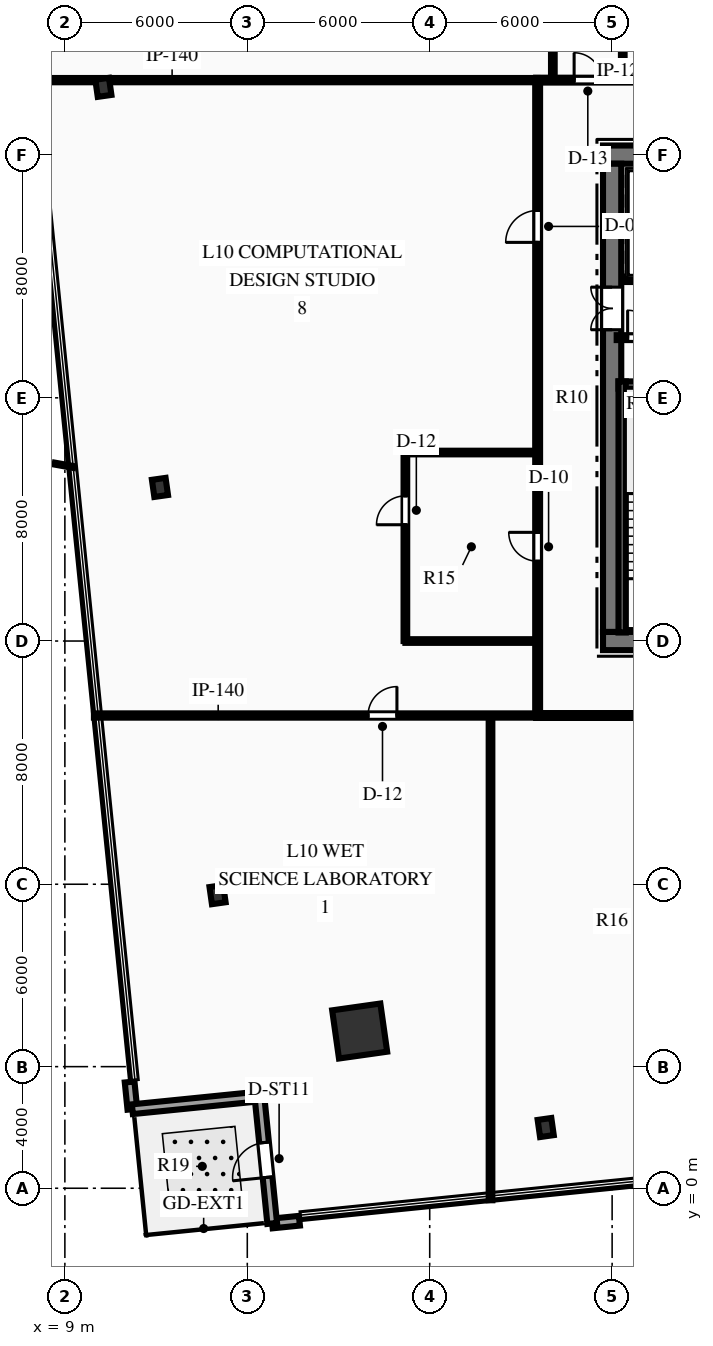
"""IFC4 building model, lengths in metres.
Left out: names, types, materials, properties, quantities, classifications, styles, units other than length and angle.
Written with IfcOpenShell. Run it as: python <this file> out.ifc"""

import sys

from ifc_helpers import new_model, si_unit, direction, frame, frame_2d, origin, origin_2d, place, context, subcontext, project, spatial, rectangle, hollow_rectangle, i_section, extrude, element, fill, save


model = new_model("IFC4")
c1 = context("Model", 3, precision=1e-05, world=origin(), true_north=direction((0.0, 1.0)))
c2 = subcontext(c1, "Body", "Model", "MODEL_VIEW")
j1 = project(units=[si_unit("LENGTHUNIT", "METRE"), si_unit("PLANEANGLEUNIT", "RADIAN")], contexts=[c1])
p1 = place(None, origin())
s1 = spatial("IfcSite", under=j1, at=p1, CompositionType="ELEMENT")
p2 = place(p1, origin())
s2 = spatial("IfcBuilding", under=s1, at=p2, CompositionType="ELEMENT")
p3 = place(p2, frame((0.0, 0.0, 47.7)))
s3 = spatial("IfcBuildingStorey", under=s2, at=p3, CompositionType="ELEMENT", Elevation=47.7)
p4 = place(p3, frame((26.7, 18.0, 0.0), z_axis=(0.0, 0.0, 1.0), x_axis=(1.0, 0.0, 0.0)))
e1 = element("IfcWall", 1, at=p4, inside=s3, PredefinedType="SHEAR", context=c2, shape_type="SweptSolid", body=[
    extrude(rectangle(XDim=18.6, YDim=0.6, at=frame_2d((9.3, 0.0))), origin(), (0.0, 0.0, 1.0), 3.75),
])
p5 = place(p4, frame((7.4, 0.0, 0.0)))
e2 = element("IfcOpeningElement", 2, at=p5, cuts=e1, PredefinedType="OPENING", context=c2, shape_type="SweptSolid", body=[
    extrude(rectangle(XDim=1.1, YDim=2.15, at=frame_2d((0.55, 1.075))), frame((0.0, 0.31, 0.0), z_axis=(0.0, -1.0, 0.0), x_axis=(1.0, 0.0, 0.0)), (0.0, 0.0, 1.0), 0.62),
])
p6 = place(p4, frame((10.1, 0.0, 0.0)))
e3 = element("IfcOpeningElement", 3, at=p6, cuts=e1, PredefinedType="OPENING", context=c2, shape_type="SweptSolid", body=[
    extrude(rectangle(XDim=1.1, YDim=2.15, at=frame_2d((0.55, 1.075))), frame((0.0, 0.31, 0.0), z_axis=(0.0, -1.0, 0.0), x_axis=(1.0, 0.0, 0.0)), (0.0, 0.0, 1.0), 0.62),
])
p7 = place(p3, frame((26.7, 34.0, 0.0), z_axis=(0.0, 0.0, 1.0), x_axis=(1.0, 0.0, 0.0)))
e4 = element("IfcWall", 4, at=p7, inside=s3, PredefinedType="SHEAR", context=c2, shape_type="SweptSolid", body=[
    extrude(rectangle(XDim=18.6, YDim=0.6, at=frame_2d((9.3, 0.0))), origin(), (0.0, 0.0, 1.0), 3.75),
])
p8 = place(p7, frame((1.265, 0.0, 0.0)))
e5 = element("IfcOpeningElement", 5, at=p8, cuts=e4, PredefinedType="OPENING", context=c2, shape_type="SweptSolid", body=[
    extrude(rectangle(XDim=1.1, YDim=2.15, at=frame_2d((0.55, 1.075))), frame((0.0, 0.31, 0.0), z_axis=(0.0, -1.0, 0.0), x_axis=(1.0, 0.0, 0.0)), (0.0, 0.0, 1.0), 0.62),
])
p9 = place(p7, frame((3.515, 0.0, 0.0)))
e6 = element("IfcOpeningElement", 6, at=p9, cuts=e4, PredefinedType="OPENING", context=c2, shape_type="SweptSolid", body=[
    extrude(rectangle(XDim=1.1, YDim=2.15, at=frame_2d((0.55, 1.075))), frame((0.0, 0.31, 0.0), z_axis=(0.0, -1.0, 0.0), x_axis=(1.0, 0.0, 0.0)), (0.0, 0.0, 1.0), 0.62),
])
p10 = place(p7, frame((13.985, 0.0, 0.0)))
e7 = element("IfcOpeningElement", 7, at=p10, cuts=e4, PredefinedType="OPENING", context=c2, shape_type="SweptSolid", body=[
    extrude(rectangle(XDim=1.1, YDim=2.15, at=frame_2d((0.55, 1.075))), frame((0.0, 0.31, 0.0), z_axis=(0.0, -1.0, 0.0), x_axis=(1.0, 0.0, 0.0)), (0.0, 0.0, 1.0), 0.62),
])
p11 = place(p7, frame((16.235, 0.0, 0.0)))
e8 = element("IfcOpeningElement", 8, at=p11, cuts=e4, PredefinedType="OPENING", context=c2, shape_type="SweptSolid", body=[
    extrude(rectangle(XDim=1.1, YDim=2.15, at=frame_2d((0.55, 1.075))), frame((0.0, 0.31, 0.0), z_axis=(0.0, -1.0, 0.0), x_axis=(1.0, 0.0, 0.0)), (0.0, 0.0, 1.0), 0.62),
])
p12 = place(p3, frame((27.0, 18.3, 0.0), z_axis=(0.0, 0.0, 1.0), x_axis=(0.0, 1.0, 0.0)))
e9 = element("IfcWall", 9, at=p12, inside=s3, PredefinedType="SHEAR", context=c2, shape_type="SweptSolid", body=[
    extrude(rectangle(XDim=15.4, YDim=0.6, at=frame_2d((7.7, 0.0))), origin(), (0.0, 0.0, 1.0), 3.75),
])
p13 = place(p12, frame((9.94, 0.0, 0.0)))
e10 = element("IfcOpeningElement", 10, at=p13, cuts=e9, PredefinedType="OPENING", context=c2, shape_type="SweptSolid", body=[
    extrude(rectangle(XDim=1.4, YDim=2.2, at=frame_2d((0.7, 1.1))), frame((0.0, 0.31, 0.0), z_axis=(0.0, -1.0, 0.0), x_axis=(1.0, 0.0, 0.0)), (0.0, 0.0, 1.0), 0.62),
])
p14 = place(p3, frame((27.21, 26.42, 0.0), z_axis=(0.0, 0.0, 1.0), x_axis=(1.0, 0.0, 0.0)))
e11 = element("IfcWall", 11, at=p14, inside=s3, PredefinedType="SHEAR", context=c2, shape_type="SweptSolid", body=[
    extrude(rectangle(XDim=3.98, YDim=0.24, at=frame_2d((1.99, 0.0))), origin(), (0.0, 0.0, 1.0), 3.75),
])
p15 = place(p3, frame((27.33, 18.28, 0.0), z_axis=(0.0, 0.0, 1.0), x_axis=(0.0, 1.0, 0.0)))
e12 = element("IfcWall", 12, at=p15, inside=s3, PredefinedType="SHEAR", context=c2, shape_type="SweptSolid", body=[
    extrude(rectangle(XDim=8.26, YDim=0.24, at=frame_2d((4.13, 0.0))), origin(), (0.0, 0.0, 1.0), 3.75),
])
p16 = place(p3, frame((18.696, 5.172, 0.0), z_axis=(0.0, 0.0, 1.0), x_axis=(0.990146240249, 0.140037219771, 0.0)))
e13 = element("IfcColumn", 13, at=p16, inside=s3, PredefinedType="COLUMN", context=c2, shape_type="SweptSolid", body=[
    extrude(hollow_rectangle(XDim=1.6, YDim=1.6, WallThickness=0.08, at=origin_2d()), origin(), (0.0, 0.0, 1.0), 3.75),
])
for number, where, z_axis, x_axis in (
    (14, (24.815, 1.997, 0.0), (0.0, 0.0, 1.0), (0.99, 0.14, 0.0)),
    (15, (10.266, 36.213, 0.0), (0.0, 0.0, 1.0), (0.99, 0.14, 0.0)),
    (16, (12.127, 23.053, 0.0), (0.0, 0.0, 1.0), (0.99, 0.14, 0.0)),
    (17, (14.022, 9.657, 0.0), (0.0, 0.0, 1.0), (0.99, 0.14, 0.0)),
):
    element("IfcColumn", number, at=place(p3, frame(where, z_axis=z_axis, x_axis=x_axis)), inside=s3, PredefinedType="COLUMN", context=c2, shape_type="SweptSolid", body=[
        extrude(i_section(OverallWidth=0.454, OverallDepth=0.569, WebThickness=0.078, FlangeThickness=0.125, at=origin_2d()), origin(), (0.0, 0.0, 1.0), 3.75),
    ])
for number, where, z_axis, x_axis in (
    (18, (16.715, -1.068, 0.0), (0.0, 0.0, 1.0), (-0.995, -0.1, 0.0)),
    (19, (11.22, 2.6, 0.0), (0.0, 0.0, 1.0), (-0.1, 0.995, 0.0)),
):
    element("IfcWall", number, at=place(p3, frame(where, z_axis=z_axis, x_axis=x_axis)), inside=s3, PredefinedType="STANDARD", context=c2, shape_type="SweptSolid", body=[
        extrude(rectangle(XDim=0.9, YDim=0.32, at=frame_2d((0.45, 0.0))), origin(), (0.0, 0.0, 1.0), 3.44),
    ])
p17 = place(p3, frame((15.399, 3.021, 0.0), z_axis=(0.0, 0.0, 1.0), x_axis=(-0.994966149633, -0.100211581584, 0.0)))
e20 = element("IfcWall", 20, at=p17, inside=s3, PredefinedType="STANDARD", context=c2, shape_type="SweptSolid", body=[
    extrude(rectangle(XDim=4.2, YDim=0.32, at=frame_2d((2.1, 0.0))), origin(), (0.0, 0.0, 1.0), 3.44),
])
p18 = place(p3, frame((15.819, -1.158, 0.0), z_axis=(0.0, 0.0, 1.0), x_axis=(-0.10015403745, 0.994971943716, 0.0)))
e21 = element("IfcWall", 21, at=p18, inside=s3, PredefinedType="STANDARD", context=c2, shape_type="SweptSolid", body=[
    extrude(rectangle(XDim=4.2, YDim=0.32, at=frame_2d((2.1, 0.0))), origin(), (0.0, 0.0, 1.0), 3.44),
])
p19 = place(p18, frame((1.525, 0.0, 0.0)))
e22 = element("IfcOpeningElement", 22, at=p19, cuts=e21, PredefinedType="OPENING", context=c2, shape_type="SweptSolid", body=[
    extrude(rectangle(XDim=1.15, YDim=2.2, at=frame_2d((0.575, 1.1))), frame((0.0, 0.17, 0.0), z_axis=(0.0, -1.0, 0.0), x_axis=(1.0, 0.0, 0.0)), (0.0, 0.0, 1.0), 0.34),
])
p20 = place(p3, frame((27.15, 27.98, 0.0), z_axis=(0.0, 0.0, 1.0), x_axis=(1.0, 0.0, 0.0)))
e23 = element("IfcWall", 23, at=p20, inside=s3, PredefinedType="PARTITIONING", context=c2, shape_type="SweptSolid", body=[
    extrude(rectangle(XDim=4.05, YDim=0.16, at=frame_2d((2.025, 0.0))), origin(), (0.0, 0.0, 1.0), 3.44),
])
p21 = place(p20, frame((0.36, 0.0, 0.0)))
e24 = element("IfcOpeningElement", 24, at=p21, cuts=e23, PredefinedType="OPENING", context=c2, shape_type="SweptSolid", body=[
    extrude(rectangle(XDim=0.9, YDim=2.15, at=frame_2d((0.45, 1.075))), frame((0.0, 0.09, 0.0), z_axis=(0.0, -1.0, 0.0), x_axis=(1.0, 0.0, 0.0)), (0.0, 0.0, 1.0), 0.18),
])
p22 = place(p20, frame((1.63, 0.0, 0.0)))
e25 = element("IfcOpeningElement", 25, at=p22, cuts=e23, PredefinedType="OPENING", context=c2, shape_type="SweptSolid", body=[
    extrude(rectangle(XDim=0.9, YDim=2.15, at=frame_2d((0.45, 1.075))), frame((0.0, 0.09, 0.0), z_axis=(0.0, -1.0, 0.0), x_axis=(1.0, 0.0, 0.0)), (0.0, 0.0, 1.0), 0.18),
])
p23 = place(p20, frame((2.788, 0.0, 0.0)))
e26 = element("IfcOpeningElement", 26, at=p23, cuts=e23, PredefinedType="OPENING", context=c2, shape_type="SweptSolid", body=[
    extrude(rectangle(XDim=0.9, YDim=2.15, at=frame_2d((0.45, 1.075))), frame((0.0, 0.09, 0.0), z_axis=(0.0, -1.0, 0.0), x_axis=(1.0, 0.0, 0.0)), (0.0, 0.0, 1.0), 0.18),
])
p24 = place(p3, frame((27.45, 29.9, 0.0), z_axis=(0.0, 0.0, 1.0), x_axis=(1.0, 0.0, 0.0)))
e27 = element("IfcWall", 27, at=p24, inside=s3, PredefinedType="PARTITIONING", context=c2, shape_type="SweptSolid", body=[
    extrude(rectangle(XDim=4.43, YDim=0.18, at=frame_2d((2.215, 0.0))), origin(), (0.0, 0.0, 1.0), 3.44),
])
p25 = place(p24, frame((0.515, 0.0, 0.0)))
e28 = element("IfcOpeningElement", 28, at=p25, cuts=e27, PredefinedType="OPENING", context=c2, shape_type="SweptSolid", body=[
    extrude(rectangle(XDim=1.1, YDim=2.15, at=frame_2d((0.55, 1.075))), frame((0.0, 0.1, 0.0), z_axis=(0.0, -1.0, 0.0), x_axis=(1.0, 0.0, 0.0)), (0.0, 0.0, 1.0), 0.2),
])
p26 = place(p24, frame((2.765, 0.0, 0.0)))
e29 = element("IfcOpeningElement", 29, at=p26, cuts=e27, PredefinedType="OPENING", context=c2, shape_type="SweptSolid", body=[
    extrude(rectangle(XDim=1.1, YDim=2.15, at=frame_2d((0.55, 1.075))), frame((0.0, 0.1, 0.0), z_axis=(0.0, -1.0, 0.0), x_axis=(1.0, 0.0, 0.0)), (0.0, 0.0, 1.0), 0.2),
])
p27 = place(p3, frame((27.45, 31.75, 0.0), z_axis=(0.0, 0.0, 1.0), x_axis=(1.0, 0.0, 0.0)))
e30 = element("IfcWall", 30, at=p27, inside=s3, PredefinedType="PARTITIONING", context=c2, shape_type="SweptSolid", body=[
    extrude(rectangle(XDim=4.43, YDim=0.18, at=frame_2d((2.215, 0.0))), origin(), (0.0, 0.0, 1.0), 3.44),
])
p28 = place(p3, frame((24.5, 15.55, 0.0), z_axis=(0.0, 0.0, 1.0), x_axis=(1.0, 0.0, 0.0)))
e31 = element("IfcWall", 31, at=p28, inside=s3, PredefinedType="PARTITIONING", context=c2, shape_type="SweptSolid", body=[
    extrude(rectangle(XDim=23.0, YDim=0.16, at=frame_2d((11.5, 0.0))), origin(), (0.0, 0.0, 1.0), 3.44),
])
p29 = place(p28, frame((4.121, 0.0, 0.0)))
e32 = element("IfcOpeningElement", 32, at=p29, cuts=e31, PredefinedType="OPENING", context=c2, shape_type="SweptSolid", body=[
    extrude(rectangle(XDim=1.05, YDim=2.15, at=frame_2d((0.525, 1.075))), frame((0.0, 0.09, 0.0), z_axis=(0.0, -1.0, 0.0), x_axis=(1.0, 0.0, 0.0)), (0.0, 0.0, 1.0), 0.18),
])
p30 = place(p28, frame((9.535, 0.0, 0.0)))
e33 = element("IfcOpeningElement", 33, at=p30, cuts=e31, PredefinedType="OPENING", context=c2, shape_type="SweptSolid", body=[
    extrude(rectangle(XDim=1.05, YDim=2.15, at=frame_2d((0.525, 1.075))), frame((0.0, 0.09, 0.0), z_axis=(0.0, -1.0, 0.0), x_axis=(1.0, 0.0, 0.0)), (0.0, 0.0, 1.0), 0.18),
])
p31 = place(p28, frame((19.809, 0.0, 0.0)))
e34 = element("IfcOpeningElement", 34, at=p31, cuts=e31, PredefinedType="OPENING", context=c2, shape_type="SweptSolid", body=[
    extrude(rectangle(XDim=1.05, YDim=2.15, at=frame_2d((0.525, 1.075))), frame((0.0, 0.09, 0.0), z_axis=(0.0, -1.0, 0.0), x_axis=(1.0, 0.0, 0.0)), (0.0, 0.0, 1.0), 0.18),
])
p32 = place(p3, frame((24.5, 36.45, 0.0), z_axis=(0.0, 0.0, 1.0), x_axis=(1.0, 0.0, 0.0)))
e35 = element("IfcWall", 35, at=p32, inside=s3, PredefinedType="PARTITIONING", context=c2, shape_type="SweptSolid", body=[
    extrude(rectangle(XDim=23.0, YDim=0.16, at=frame_2d((11.5, 0.0))), origin(), (0.0, 0.0, 1.0), 3.44),
])
p33 = place(p32, frame((1.25, 0.0, 0.0)))
e36 = element("IfcOpeningElement", 36, at=p33, cuts=e35, PredefinedType="OPENING", context=c2, shape_type="SweptSolid", body=[
    extrude(rectangle(XDim=0.9, YDim=2.15, at=frame_2d((0.45, 1.075))), frame((0.0, 0.09, 0.0), z_axis=(0.0, -1.0, 0.0), x_axis=(1.0, 0.0, 0.0)), (0.0, 0.0, 1.0), 0.18),
])
p34 = place(p32, frame((3.55, 0.0, 0.0)))
e37 = element("IfcOpeningElement", 37, at=p34, cuts=e35, PredefinedType="OPENING", context=c2, shape_type="SweptSolid", body=[
    extrude(rectangle(XDim=0.9, YDim=2.15, at=frame_2d((0.45, 1.075))), frame((0.0, 0.09, 0.0), z_axis=(0.0, -1.0, 0.0), x_axis=(1.0, 0.0, 0.0)), (0.0, 0.0, 1.0), 0.18),
])
p35 = place(p32, frame((5.8, 0.0, 0.0)))
e38 = element("IfcOpeningElement", 38, at=p35, cuts=e35, PredefinedType="OPENING", context=c2, shape_type="SweptSolid", body=[
    extrude(rectangle(XDim=1.0, YDim=2.15, at=frame_2d((0.5, 1.075))), frame((0.0, 0.09, 0.0), z_axis=(0.0, -1.0, 0.0), x_axis=(1.0, 0.0, 0.0)), (0.0, 0.0, 1.0), 0.18),
])
p36 = place(p32, frame((13.545, 0.0, 0.0)))
e39 = element("IfcOpeningElement", 39, at=p36, cuts=e35, PredefinedType="OPENING", context=c2, shape_type="SweptSolid", body=[
    extrude(rectangle(XDim=1.05, YDim=2.15, at=frame_2d((0.525, 1.075))), frame((0.0, 0.09, 0.0), z_axis=(0.0, -1.0, 0.0), x_axis=(1.0, 0.0, 0.0)), (0.0, 0.0, 1.0), 0.18),
])
p37 = place(p32, frame((18.169, 0.0, 0.0)))
e40 = element("IfcOpeningElement", 40, at=p37, cuts=e35, PredefinedType="OPENING", context=c2, shape_type="SweptSolid", body=[
    extrude(rectangle(XDim=1.05, YDim=2.15, at=frame_2d((0.525, 1.075))), frame((0.0, 0.09, 0.0), z_axis=(0.0, -1.0, 0.0), x_axis=(1.0, 0.0, 0.0)), (0.0, 0.0, 1.0), 0.18),
])
p38 = place(p3, frame((24.55, 15.55, 0.0), z_axis=(0.0, 0.0, 1.0), x_axis=(0.0, 1.0, 0.0)))
e41 = element("IfcWall", 41, at=p38, inside=s3, PredefinedType="PARTITIONING", context=c2, shape_type="SweptSolid", body=[
    extrude(rectangle(XDim=20.9, YDim=0.16, at=frame_2d((10.45, 0.0))), origin(), (0.0, 0.0, 1.0), 3.44),
])
p39 = place(p38, frame((5.075, 0.0, 0.0)))
e42 = element("IfcOpeningElement", 42, at=p39, cuts=e41, PredefinedType="OPENING", context=c2, shape_type="SweptSolid", body=[
    extrude(rectangle(XDim=0.95, YDim=2.15, at=frame_2d((0.475, 1.075))), frame((0.0, 0.09, 0.0), z_axis=(0.0, -1.0, 0.0), x_axis=(1.0, 0.0, 0.0)), (0.0, 0.0, 1.0), 0.18),
])
p40 = place(p38, frame((15.563, 0.0, 0.0)))
e43 = element("IfcOpeningElement", 43, at=p40, cuts=e41, PredefinedType="OPENING", context=c2, shape_type="SweptSolid", body=[
    extrude(rectangle(XDim=1.05, YDim=2.15, at=frame_2d((0.525, 1.075))), frame((0.0, 0.09, 0.0), z_axis=(0.0, -1.0, 0.0), x_axis=(1.0, 0.0, 0.0)), (0.0, 0.0, 1.0), 0.18),
])
for number, where, z_axis, x_axis in (
    (44, (25.05, 36.45, 0.0), (0.0, 0.0, 1.0), (0.0, 1.0, 0.0)),
    (45, (27.35, 36.45, 0.0), (0.0, 0.0, 1.0), (0.0, 1.0, 0.0)),
):
    element("IfcWall", number, at=place(p3, frame(where, z_axis=z_axis, x_axis=x_axis)), inside=s3, PredefinedType="PARTITIONING", context=c2, shape_type="SweptSolid", body=[
        extrude(rectangle(XDim=3.9, YDim=0.12, at=frame_2d((1.95, 0.0))), origin(), (0.0, 0.0, 1.0), 3.44),
    ])
p41 = place(p3, frame((9.956, 15.55, 0.0), z_axis=(0.0, 0.0, 1.0), x_axis=(1.0, 0.0, 0.0)))
e46 = element("IfcWall", 46, at=p41, inside=s3, PredefinedType="PARTITIONING", context=c2, shape_type="SweptSolid", body=[
    extrude(rectangle(XDim=14.594, YDim=0.14, at=frame_2d((7.297, 0.0))), origin(), (0.0, 0.0, 1.0), 3.44),
])
p42 = place(p41, frame((9.016, 0.0, 0.0)))
e47 = element("IfcOpeningElement", 47, at=p42, cuts=e46, PredefinedType="OPENING", context=c2, shape_type="SweptSolid", body=[
    extrude(rectangle(XDim=0.95, YDim=2.15, at=frame_2d((0.475, 1.075))), frame((0.0, 0.08, 0.0), z_axis=(0.0, -1.0, 0.0), x_axis=(1.0, 0.0, 0.0)), (0.0, 0.0, 1.0), 0.16),
])
p43 = place(p3, frame((7.852, 36.45, 0.0), z_axis=(0.0, 0.0, 1.0), x_axis=(1.0, 0.0, 0.0)))
e48 = element("IfcWall", 48, at=p43, inside=s3, PredefinedType="PARTITIONING", context=c2, shape_type="SweptSolid", body=[
    extrude(rectangle(XDim=16.698, YDim=0.14, at=frame_2d((8.349, 0.0))), origin(), (0.0, 0.0, 1.0), 2.739),
])
p44 = place(p3, frame((23.0, -0.395, 0.0), z_axis=(0.0, 0.0, 1.0), x_axis=(0.0, 1.0, 0.0)))
e49 = element("IfcWall", 49, at=p44, inside=s3, PredefinedType="PARTITIONING", context=c2, shape_type="SweptSolid", body=[
    extrude(rectangle(XDim=15.945, YDim=0.12, at=frame_2d((7.973, 0.0))), origin(), (0.0, 0.0, 1.0), 3.44),
])
p45 = place(p3, frame((20.2, 18.0, 0.0), z_axis=(0.0, 0.0, 1.0), x_axis=(1.0, 0.0, 0.0)))
e50 = element("IfcWall", 50, at=p45, inside=s3, PredefinedType="PARTITIONING", context=c2, shape_type="SweptSolid", body=[
    extrude(rectangle(XDim=4.35, YDim=0.12, at=frame_2d((2.175, 0.0))), origin(), (0.0, 0.0, 1.0), 3.44),
])
p46 = place(p3, frame((20.2, 18.0, 0.0), z_axis=(0.0, 0.0, 1.0), x_axis=(0.0, 1.0, 0.0)))
e51 = element("IfcWall", 51, at=p46, inside=s3, PredefinedType="PARTITIONING", context=c2, shape_type="SweptSolid", body=[
    extrude(rectangle(XDim=6.2, YDim=0.12, at=frame_2d((3.1, 0.0))), origin(), (0.0, 0.0, 1.0), 3.44),
])
p47 = place(p46, frame((3.825, 0.0, 0.0)))
e52 = element("IfcOpeningElement", 52, at=p47, cuts=e51, PredefinedType="OPENING", context=c2, shape_type="SweptSolid", body=[
    extrude(rectangle(XDim=0.95, YDim=2.15, at=frame_2d((0.475, 1.075))), frame((0.0, 0.07, 0.0), z_axis=(0.0, -1.0, 0.0), x_axis=(1.0, 0.0, 0.0)), (0.0, 0.0, 1.0), 0.14),
])
p48 = place(p3, frame((20.2, 24.2, 0.0), z_axis=(0.0, 0.0, 1.0), x_axis=(1.0, 0.0, 0.0)))
e53 = element("IfcWall", 53, at=p48, inside=s3, PredefinedType="PARTITIONING", context=c2, shape_type="SweptSolid", body=[
    extrude(rectangle(XDim=4.35, YDim=0.12, at=frame_2d((2.175, 0.0))), origin(), (0.0, 0.0, 1.0), 3.44),
])
p49 = place(p19, origin())
e54 = element("IfcDoor", 54, at=p49, inside=s3, OperationType="SINGLE_SWING_LEFT", PredefinedType="DOOR", context=c2, shape_type="SweptSolid", body=[
    extrude(rectangle(XDim=1.15, YDim=2.2, at=frame_2d((0.575, 1.1))), frame((0.0, 0.025, 0.0), z_axis=(0.0, -1.0, 0.0), x_axis=(1.0, 0.0, 0.0)), (0.0, 0.0, 1.0), 0.05),
])
fill(e22, e54)
p50 = place(p21, origin())
e55 = element("IfcDoor", 55, at=p50, inside=s3, OperationType="SINGLE_SWING_LEFT", PredefinedType="DOOR", context=c2, shape_type="SweptSolid", body=[
    extrude(rectangle(XDim=0.9, YDim=2.15, at=frame_2d((0.45, 1.075))), frame((0.0, 0.025, 0.0), z_axis=(0.0, -1.0, 0.0), x_axis=(1.0, 0.0, 0.0)), (0.0, 0.0, 1.0), 0.05),
])
fill(e24, e55)
p51 = place(p13, origin())
e56 = element("IfcDoor", 56, at=p51, inside=s3, OperationType="DOUBLE_DOOR_SINGLE_SWING", PredefinedType="DOOR", context=c2, shape_type="SweptSolid", body=[
    extrude(rectangle(XDim=1.4, YDim=2.2, at=frame_2d((0.7, 1.1))), frame((0.0, 0.025, 0.0), z_axis=(0.0, -1.0, 0.0), x_axis=(1.0, 0.0, 0.0)), (0.0, 0.0, 1.0), 0.05),
])
fill(e10, e56)
p52 = place(p33, origin())
e57 = element("IfcDoor", 57, at=p52, inside=s3, OperationType="SINGLE_SWING_LEFT", PredefinedType="DOOR", context=c2, shape_type="SweptSolid", body=[
    extrude(rectangle(XDim=0.9, YDim=2.15, at=frame_2d((0.45, 1.075))), frame((0.0, 0.025, 0.0), z_axis=(0.0, -1.0, 0.0), x_axis=(1.0, 0.0, 0.0)), (0.0, 0.0, 1.0), 0.05),
])
fill(e36, e57)
p53 = place(p39, origin())
e58 = element("IfcDoor", 58, at=p53, inside=s3, OperationType="SINGLE_SWING_RIGHT", PredefinedType="DOOR", context=c2, shape_type="SweptSolid", body=[
    extrude(rectangle(XDim=0.95, YDim=2.15, at=frame_2d((0.475, 1.075))), frame((0.0, 0.025, 0.0), z_axis=(0.0, -1.0, 0.0), x_axis=(1.0, 0.0, 0.0)), (0.0, 0.0, 1.0), 0.05),
])
fill(e42, e58)
p54 = place(p47, origin())
e59 = element("IfcDoor", 59, at=p54, inside=s3, OperationType="SINGLE_SWING_LEFT", PredefinedType="DOOR", context=c2, shape_type="SweptSolid", body=[
    extrude(rectangle(XDim=0.95, YDim=2.15, at=frame_2d((0.475, 1.075))), frame((0.0, 0.025, 0.0), z_axis=(0.0, -1.0, 0.0), x_axis=(1.0, 0.0, 0.0)), (0.0, 0.0, 1.0), 0.05),
])
fill(e52, e59)
p55 = place(p42, origin())
e60 = element("IfcDoor", 60, at=p55, inside=s3, OperationType="SINGLE_SWING_RIGHT", PredefinedType="DOOR", context=c2, shape_type="SweptSolid", body=[
    extrude(rectangle(XDim=0.95, YDim=2.15, at=frame_2d((0.475, 1.075))), frame((0.0, 0.025, 0.0), z_axis=(0.0, -1.0, 0.0), x_axis=(1.0, 0.0, 0.0)), (0.0, 0.0, 1.0), 0.05),
])
fill(e47, e60)
p56 = place(p40, origin())
e61 = element("IfcDoor", 61, at=p56, inside=s3, OperationType="SINGLE_SWING_LEFT", PredefinedType="DOOR", context=c2, shape_type="SweptSolid", body=[
    extrude(rectangle(XDim=1.05, YDim=2.15, at=frame_2d((0.525, 1.075))), frame((0.0, 0.025, 0.0), z_axis=(0.0, -1.0, 0.0), x_axis=(1.0, 0.0, 0.0)), (0.0, 0.0, 1.0), 0.05),
])
fill(e43, e61)
save(model, sys.argv[1])
